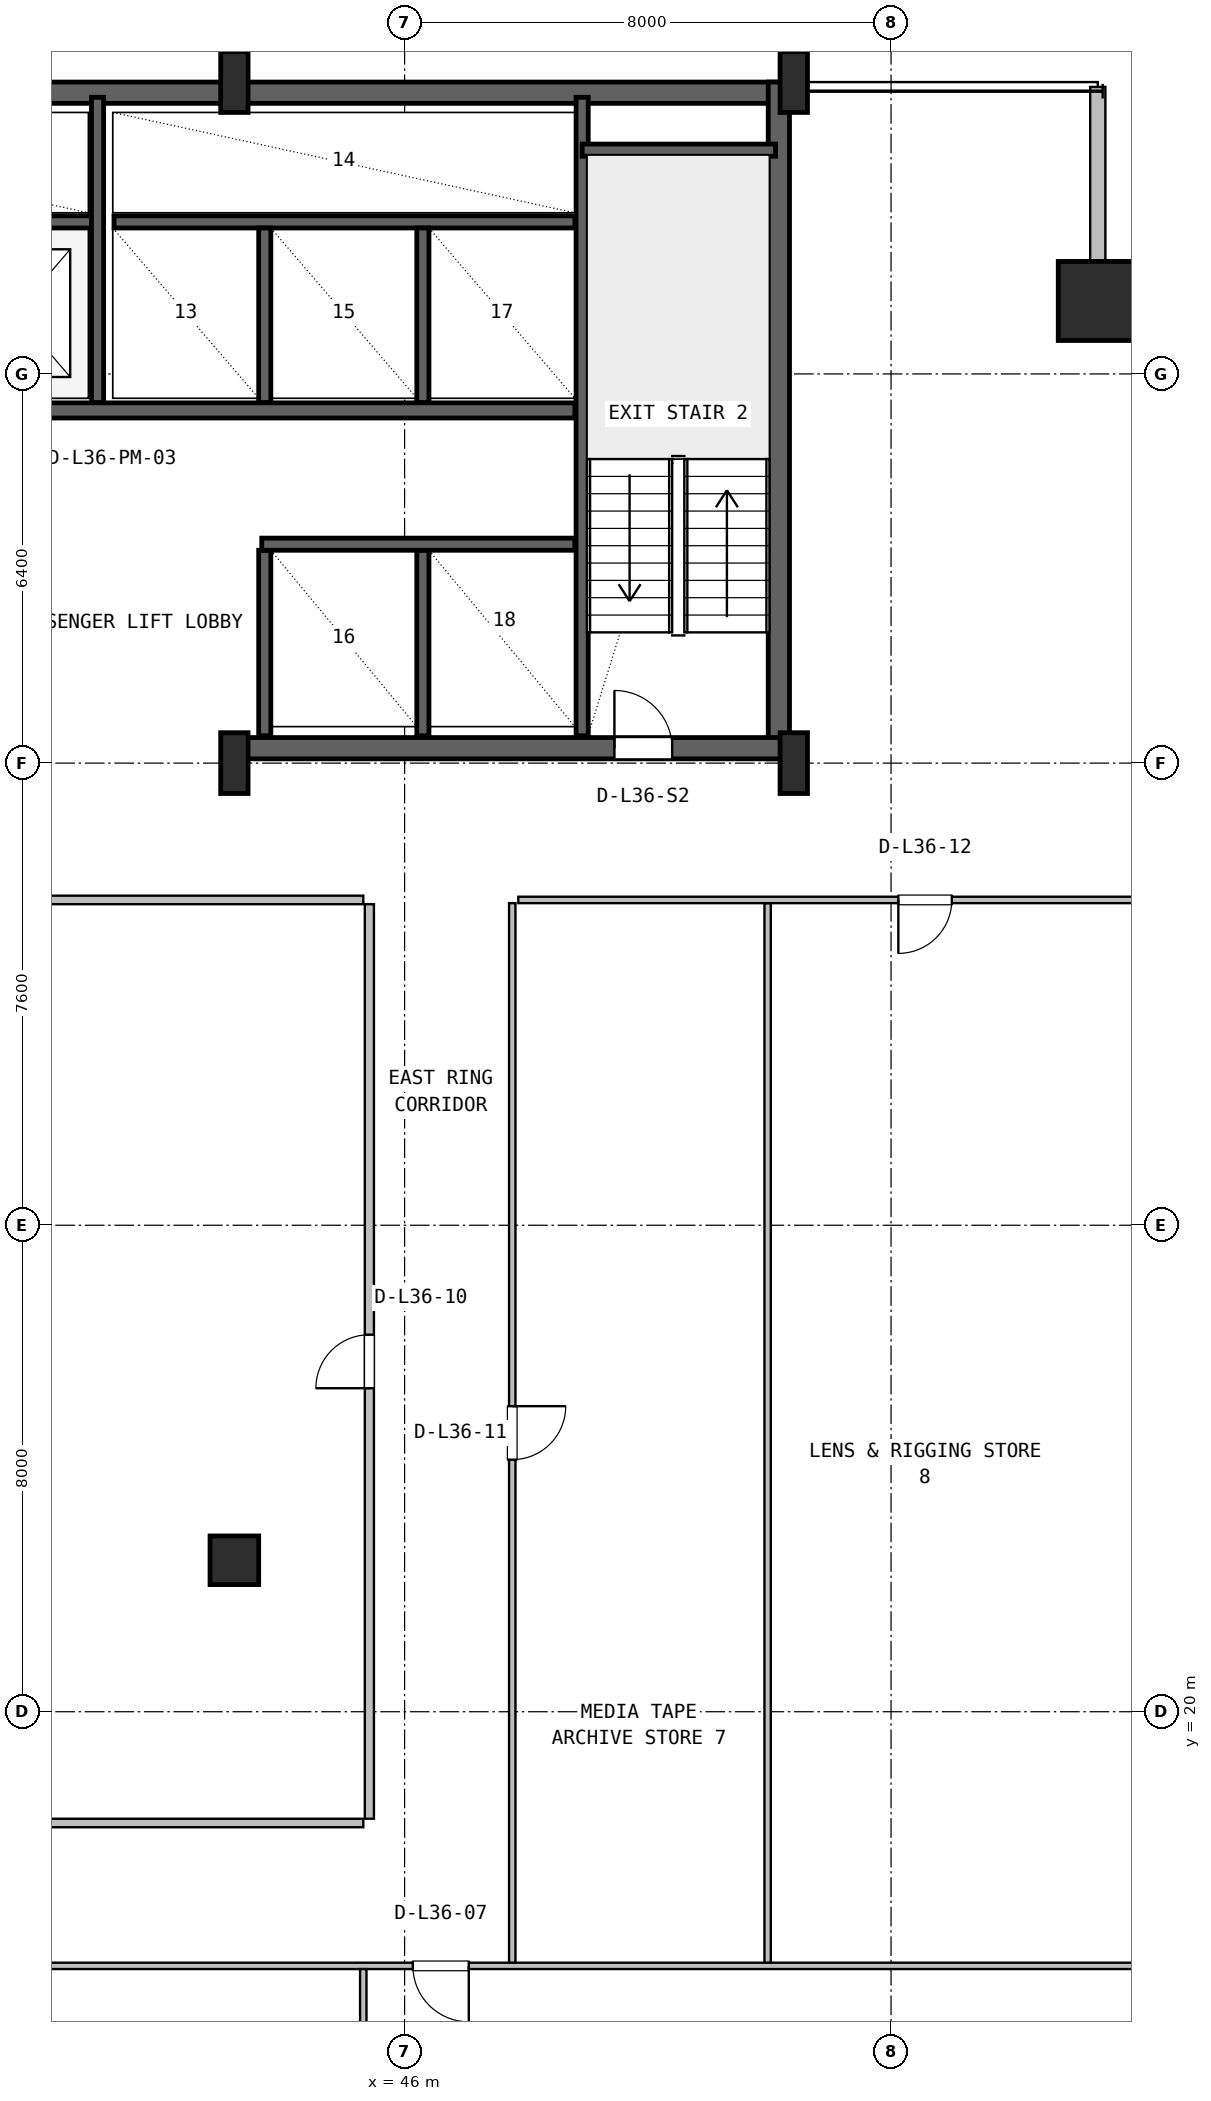
"""IFC4 building model, lengths in metres.
Left out: names, types, materials, properties, quantities, classifications, styles, units other than length and angle.
Written with IfcOpenShell. Run it as: python <this file> out.ifc"""

import sys

from ifc_helpers import new_model, si_unit, direction, frame, frame_2d, origin, origin_2d, place, context, subcontext, project, spatial, rectangle, hollow_rectangle, i_section, extrude, source, transform, mapped, element, fill, save


model = new_model("IFC4")
c1 = context("Model", 3, precision=1e-05, world=origin(), true_north=direction((0.0, 1.0)))
c2 = subcontext(c1, "Body", "Model", "MODEL_VIEW")
j1 = project(units=[si_unit("LENGTHUNIT", "METRE"), si_unit("PLANEANGLEUNIT", "RADIAN")], contexts=[c1])
p1 = place(None, origin())
s1 = spatial("IfcSite", under=j1, at=p1, CompositionType="ELEMENT")
p2 = place(p1, origin())
s2 = spatial("IfcBuilding", under=s1, at=p2, CompositionType="ELEMENT")
p3 = place(p2, frame((0.0, 0.0, 149.6)))
s3 = spatial("IfcBuildingStorey", under=s2, at=p3, CompositionType="ELEMENT", Elevation=149.6)
p4 = place(p3, frame((15.6, 46.625, 0.0), z_axis=(0.0, 0.0, 1.0), x_axis=(1.0, 0.0, 0.0)))
e1 = element("IfcWall", 1, at=p4, inside=s3, PredefinedType="SHEAR", context=c2, shape_type="SweptSolid", body=[
    extrude(rectangle(XDim=36.8, YDim=0.35, at=frame_2d((18.4, 0.0))), origin(), (0.0, 0.0, 1.0), 3.55),
])
p5 = place(p3, frame((52.155, 35.67, 0.0), z_axis=(0.0, 0.0, 1.0), x_axis=(0.0, 1.0, 0.0)))
e2 = element("IfcWall", 2, at=p5, inside=s3, PredefinedType="SHEAR", context=c2, shape_type="SweptSolid", body=[
    extrude(rectangle(XDim=11.13, YDim=0.35, at=frame_2d((5.565, 0.0))), origin(), (0.0, 0.0, 1.0), 3.55),
])
p6 = place(p3, frame((43.2, 35.845, 0.0), z_axis=(0.0, 0.0, 1.0), x_axis=(1.0, 0.0, 0.0)))
e3 = element("IfcWall", 3, at=p6, inside=s3, PredefinedType="SHEAR", context=c2, shape_type="SweptSolid", body=[
    extrude(rectangle(XDim=9.13, YDim=0.35, at=frame_2d((4.565, 0.0))), origin(), (0.0, 0.0, 1.0), 3.55),
])
p7 = place(p6, frame((6.25, 0.0, 0.0)))
e4 = element("IfcOpeningElement", 4, at=p7, cuts=e3, PredefinedType="OPENING", context=c2, shape_type="SweptSolid", body=[
    extrude(rectangle(XDim=0.95, YDim=2.1, at=frame_2d((0.475, 1.05))), frame((0.0, 0.185, 0.0), z_axis=(0.0, -1.0, 0.0), x_axis=(1.0, 0.0, 0.0)), (0.0, 0.0, 1.0), 0.37),
])
m1 = source(origin(), c2, "Body", "SweptSolid", [
    extrude(i_section(OverallWidth=0.45, OverallDepth=1.0, WebThickness=0.016, FlangeThickness=0.03, FilletRadius=0.016, at=origin_2d()), origin(), (0.0, 0.0, 1.0), 3.8),
])
for number, where, z_axis, x_axis in (
    (5, (43.2, 35.6, 0.0), (0.0, 0.0, 1.0), (1.0, 0.0, 0.0)),
    (6, (43.2, 46.8, 0.0), (0.0, 0.0, 1.0), (1.0, 0.0, 0.0)),
    (7, (52.4, 35.6, 0.0), (0.0, 0.0, 1.0), (1.0, 0.0, 0.0)),
    (8, (52.4, 46.8, 0.0), (0.0, 0.0, 1.0), (1.0, 0.0, 0.0)),
):
    element("IfcColumn", number, at=place(p3, frame(where, z_axis=z_axis, x_axis=x_axis)), inside=s3, PredefinedType="COLUMN", context=c2, shape_type="MappedRepresentation", body=[
        mapped(m1, transform((0.0, 0.0, 0.0), x_axis=(1.0, 0.0, 0.0), y_axis=(0.0, 1.0, 0.0), z_axis=(0.0, 0.0, 1.0), scale=1.0)),
    ])
m2 = source(origin(), c2, "Body", "SweptSolid", [
    extrude(hollow_rectangle(XDim=1.3, YDim=1.3, WallThickness=0.05, at=origin_2d()), origin(), (0.0, 0.0, 1.0), 3.8),
])
p8 = place(p3, frame((57.4, 43.2, 0.0), z_axis=(0.0, 0.0, 1.0), x_axis=(1.0, 0.0, 0.0)))
e9 = element("IfcColumn", 9, at=p8, inside=s3, PredefinedType="COLUMN", context=c2, shape_type="MappedRepresentation", body=[
    mapped(m2, transform((0.0, 0.0, 0.0), x_axis=(1.0, 0.0, 0.0), y_axis=(0.0, 1.0, 0.0), z_axis=(0.0, 0.0, 1.0), scale=1.0)),
])
m3 = source(origin(), c2, "Body", "SweptSolid", [
    extrude(rectangle(XDim=0.8, YDim=0.8, at=origin_2d()), origin(), (0.0, 0.0, 1.0), 3.8),
])
p9 = place(p3, frame((43.2, 22.49, 0.0), z_axis=(0.0, 0.0, 1.0), x_axis=(1.0, 0.0, 0.0)))
e10 = element("IfcColumn", 10, at=p9, inside=s3, PredefinedType="COLUMN", context=c2, shape_type="MappedRepresentation", body=[
    mapped(m3, transform((0.0, 0.0, 0.0), x_axis=(1.0, 0.0, 0.0), y_axis=(0.0, 1.0, 0.0), z_axis=(0.0, 0.0, 1.0), scale=1.0)),
])
p10 = place(p3, frame((57.53, 43.2, 0.0), z_axis=(0.0, 0.0, 1.0), x_axis=(1.0, 0.0, 0.0)))
e11 = element("IfcWall", 11, at=p10, inside=s3, PredefinedType="SOLIDWALL", context=c2, shape_type="SweptSolid", body=[
    extrude(rectangle(XDim=3.39, YDim=0.25, at=frame_2d((1.695, 0.0))), origin(), (0.0, 0.0, 1.0), 3.53),
])
p11 = place(p3, frame((57.4, 43.12, 0.0), z_axis=(0.0, 0.0, 1.0), x_axis=(0.0, 1.0, 0.0)))
e12 = element("IfcWall", 12, at=p11, inside=s3, PredefinedType="SOLIDWALL", context=c2, shape_type="SweptSolid", body=[
    extrude(rectangle(XDim=3.6, YDim=0.25, at=frame_2d((1.8, 0.0))), origin(), (0.0, 0.0, 1.0), 3.108),
])
p12 = place(p3, frame((48.92, 36.05, 0.0), z_axis=(0.0, 0.0, 1.0), x_axis=(0.0, 1.0, 0.0)))
e13 = element("IfcWall", 13, at=p12, inside=s3, PredefinedType="SHEAR", context=c2, shape_type="SweptSolid", body=[
    extrude(rectangle(XDim=10.5, YDim=0.2, at=frame_2d((5.25, 0.0))), origin(), (0.0, 0.0, 1.0), 3.55),
])
p13 = place(p3, frame((48.92, 45.68, 0.0), z_axis=(0.0, 0.0, 1.0), x_axis=(1.0, 0.0, 0.0)))
e14 = element("IfcWall", 14, at=p13, inside=s3, PredefinedType="SHEAR", context=c2, shape_type="SweptSolid", body=[
    extrude(rectangle(XDim=3.18, YDim=0.2, at=frame_2d((1.59, 0.0))), origin(), (0.0, 0.0, 1.0), 3.55),
])
p14 = place(p3, frame((24.98, 41.4, 0.0), z_axis=(0.0, 0.0, 1.0), x_axis=(1.0, 0.0, 0.0)))
e15 = element("IfcWall", 15, at=p14, inside=s3, PredefinedType="SHEAR", context=c2, shape_type="SweptSolid", body=[
    extrude(rectangle(XDim=23.82, YDim=0.25, at=frame_2d((11.91, 0.0))), origin(), (0.0, 0.0, 1.0), 3.55),
])
p15 = place(p14, frame((8.87, 0.0, 0.0)))
e16 = element("IfcOpeningElement", 16, at=p15, cuts=e15, PredefinedType="OPENING", context=c2, shape_type="SweptSolid", body=[
    extrude(rectangle(XDim=1.1, YDim=2.18, at=frame_2d((0.55, 1.09))), frame((0.0, 0.135, 0.0), z_axis=(0.0, -1.0, 0.0), x_axis=(1.0, 0.0, 0.0)), (0.0, 0.0, 1.0), 0.27),
])
p16 = place(p14, frame((11.47, 0.0, 0.0)))
e17 = element("IfcOpeningElement", 17, at=p16, cuts=e15, PredefinedType="OPENING", context=c2, shape_type="SweptSolid", body=[
    extrude(rectangle(XDim=1.1, YDim=2.18, at=frame_2d((0.55, 1.09))), frame((0.0, 0.135, 0.0), z_axis=(0.0, -1.0, 0.0), x_axis=(1.0, 0.0, 0.0)), (0.0, 0.0, 1.0), 0.27),
])
p17 = place(p14, frame((14.07, 0.0, 0.0)))
e18 = element("IfcOpeningElement", 18, at=p17, cuts=e15, PredefinedType="OPENING", context=c2, shape_type="SweptSolid", body=[
    extrude(rectangle(XDim=1.1, YDim=2.18, at=frame_2d((0.55, 1.09))), frame((0.0, 0.135, 0.0), z_axis=(0.0, -1.0, 0.0), x_axis=(1.0, 0.0, 0.0)), (0.0, 0.0, 1.0), 0.27),
])
p18 = place(p14, frame((1.81, 0.0, 0.0)))
e19 = element("IfcOpeningElement", 19, at=p18, cuts=e15, PredefinedType="OPENING", context=c2, shape_type="SweptSolid", body=[
    extrude(rectangle(XDim=0.92, YDim=2.08, at=frame_2d((0.46, 1.04))), frame((0.0, 0.135, 0.0), z_axis=(0.0, -1.0, 0.0), x_axis=(1.0, 0.0, 0.0)), (0.0, 0.0, 1.0), 0.27),
])
p19 = place(p14, frame((5.71, 0.0, 0.0)))
e20 = element("IfcOpeningElement", 20, at=p19, cuts=e15, PredefinedType="OPENING", context=c2, shape_type="SweptSolid", body=[
    extrude(rectangle(XDim=0.92, YDim=2.08, at=frame_2d((0.46, 1.04))), frame((0.0, 0.135, 0.0), z_axis=(0.0, -1.0, 0.0), x_axis=(1.0, 0.0, 0.0)), (0.0, 0.0, 1.0), 0.27),
])
p20 = place(p3, frame((33.22, 44.5, 0.0), z_axis=(0.0, 0.0, 1.0), x_axis=(1.0, 0.0, 0.0)))
e21 = element("IfcWall", 21, at=p20, inside=s3, PredefinedType="SHEAR", context=c2, shape_type="SweptSolid", body=[
    extrude(rectangle(XDim=7.63, YDim=0.2, at=frame_2d((3.815, 0.0))), origin(), (0.0, 0.0, 1.0), 3.55),
])
p21 = place(p3, frame((40.95, 41.53, 0.0), z_axis=(0.0, 0.0, 1.0), x_axis=(0.0, 1.0, 0.0)))
e22 = element("IfcWall", 22, at=p21, inside=s3, PredefinedType="SHEAR", context=c2, shape_type="SweptSolid", body=[
    extrude(rectangle(XDim=5.02, YDim=0.2, at=frame_2d((2.51, 0.0))), origin(), (0.0, 0.0, 1.0), 3.55),
])
p22 = place(p3, frame((41.22, 44.5, 0.0), z_axis=(0.0, 0.0, 1.0), x_axis=(1.0, 0.0, 0.0)))
e23 = element("IfcWall", 23, at=p22, inside=s3, PredefinedType="SHEAR", context=c2, shape_type="SweptSolid", body=[
    extrude(rectangle(XDim=7.58, YDim=0.2, at=frame_2d((3.79, 0.0))), origin(), (0.0, 0.0, 1.0), 3.55),
])
for number, where, z_axis, x_axis in (
    (24, (43.7, 41.53, 0.0), (0.0, 0.0, 1.0), (0.0, 1.0, 0.0)),
    (25, (46.3, 41.53, 0.0), (0.0, 0.0, 1.0), (0.0, 1.0, 0.0)),
):
    element("IfcWall", number, at=place(p3, frame(where, z_axis=z_axis, x_axis=x_axis)), inside=s3, PredefinedType="SHEAR", context=c2, shape_type="SweptSolid", body=[
        extrude(rectangle(XDim=2.87, YDim=0.2, at=frame_2d((1.435, 0.0))), origin(), (0.0, 0.0, 1.0), 3.55),
    ])
for number, where, z_axis, x_axis in (
    (26, (43.7, 36.05, 0.0), (0.0, 0.0, 1.0), (0.0, 1.0, 0.0)),
    (27, (46.3, 36.05, 0.0), (0.0, 0.0, 1.0), (0.0, 1.0, 0.0)),
):
    element("IfcWall", number, at=place(p3, frame(where, z_axis=z_axis, x_axis=x_axis)), inside=s3, PredefinedType="SHEAR", context=c2, shape_type="SweptSolid", body=[
        extrude(rectangle(XDim=3.05, YDim=0.2, at=frame_2d((1.525, 0.0))), origin(), (0.0, 0.0, 1.0), 3.55),
    ])
p23 = place(p3, frame((43.65, 39.2, 0.0), z_axis=(0.0, 0.0, 1.0), x_axis=(1.0, 0.0, 0.0)))
e28 = element("IfcWall", 28, at=p23, inside=s3, PredefinedType="SHEAR", context=c2, shape_type="SweptSolid", body=[
    extrude(rectangle(XDim=5.15, YDim=0.2, at=frame_2d((2.575, 0.0))), origin(), (0.0, 0.0, 1.0), 3.55),
])
p24 = place(p3, frame((7.18, 15.82, 0.0), z_axis=(0.0, 0.0, 1.0), x_axis=(1.0, 0.0, 0.0)))
e29 = element("IfcWall", 29, at=p24, inside=s3, PredefinedType="PARTITIONING", context=c2, shape_type="SweptSolid", body=[
    extrude(rectangle(XDim=53.64, YDim=0.105, at=frame_2d((26.82, 0.0))), origin(), (0.0, 0.0, 1.0), 2.909),
])
p25 = place(p24, frame((14.535, 0.0, 0.0)))
e30 = element("IfcOpeningElement", 30, at=p25, cuts=e29, PredefinedType="OPENING", context=c2, shape_type="SweptSolid", body=[
    extrude(rectangle(XDim=0.88, YDim=2.06, at=frame_2d((0.44, 1.03))), frame((0.0, 0.062, 0.0), z_axis=(0.0, -1.0, 0.0), x_axis=(1.0, 0.0, 0.0)), (0.0, 0.0, 1.0), 0.125),
])
p26 = place(p24, frame((26.755, 0.0, 0.0)))
e31 = element("IfcOpeningElement", 31, at=p26, cuts=e29, PredefinedType="OPENING", context=c2, shape_type="SweptSolid", body=[
    extrude(rectangle(XDim=0.88, YDim=2.06, at=frame_2d((0.44, 1.03))), frame((0.0, 0.062, 0.0), z_axis=(0.0, -1.0, 0.0), x_axis=(1.0, 0.0, 0.0)), (0.0, 0.0, 1.0), 0.125),
])
p27 = place(p24, frame((38.955, 0.0, 0.0)))
e32 = element("IfcOpeningElement", 32, at=p27, cuts=e29, PredefinedType="OPENING", context=c2, shape_type="SweptSolid", body=[
    extrude(rectangle(XDim=0.92, YDim=2.08, at=frame_2d((0.46, 1.04))), frame((0.0, 0.062, 0.0), z_axis=(0.0, -1.0, 0.0), x_axis=(1.0, 0.0, 0.0)), (0.0, 0.0, 1.0), 0.125),
])
p28 = place(p3, frame((45.32, 7.38, 0.0), z_axis=(0.0, 0.0, 1.0), x_axis=(0.0, 1.0, 0.0)))
e33 = element("IfcWall", 33, at=p28, inside=s3, PredefinedType="PARTITIONING", context=c2, shape_type="SweptSolid", body=[
    extrude(rectangle(XDim=8.388, YDim=0.105, at=frame_2d((4.194, 0.0))), origin(), (0.0, 0.0, 1.0), 3.108),
])
for number, where, z_axis, x_axis in (
    (34, (23.43, 18.17, 0.0), (0.0, 0.0, 1.0), (1.0, 0.0, 0.0)),
    (35, (23.43, 33.35, 0.0), (0.0, 0.0, 1.0), (1.0, 0.0, 0.0)),
):
    element("IfcWall", number, at=place(p3, frame(where, z_axis=z_axis, x_axis=x_axis)), inside=s3, PredefinedType="PARTITIONING", context=c2, shape_type="SweptSolid", body=[
        extrude(rectangle(XDim=21.89, YDim=0.14, at=frame_2d((10.945, 0.0))), origin(), (0.0, 0.0, 1.0), 2.909),
    ])
p29 = place(p3, frame((45.42, 18.24, 0.0), z_axis=(0.0, 0.0, 1.0), x_axis=(0.0, 1.0, 0.0)))
e36 = element("IfcWall", 36, at=p29, inside=s3, PredefinedType="PARTITIONING", context=c2, shape_type="SweptSolid", body=[
    extrude(rectangle(XDim=15.04, YDim=0.15, at=frame_2d((7.52, 0.0))), origin(), (0.0, 0.0, 1.0), 3.222),
])
p30 = place(p29, frame((7.08, 0.0, 0.0)))
e37 = element("IfcOpeningElement", 37, at=p30, cuts=e36, PredefinedType="OPENING", context=c2, shape_type="SweptSolid", body=[
    extrude(rectangle(XDim=0.88, YDim=2.06, at=frame_2d((0.44, 1.03))), frame((0.0, 0.085, 0.0), z_axis=(0.0, -1.0, 0.0), x_axis=(1.0, 0.0, 0.0)), (0.0, 0.0, 1.0), 0.17),
])
p31 = place(p3, frame((51.97, 15.873, 0.0), z_axis=(0.0, 0.0, 1.0), x_axis=(0.0, 1.0, 0.0)))
e38 = element("IfcWall", 38, at=p31, inside=s3, PredefinedType="PARTITIONING", context=c2, shape_type="SweptSolid", body=[
    extrude(rectangle(XDim=17.424, YDim=0.105, at=frame_2d((8.712, 0.0))), origin(), (0.0, 0.0, 1.0), 3.222),
])
p32 = place(p3, frame((47.87, 33.35, 0.0), z_axis=(0.0, 0.0, 1.0), x_axis=(1.0, 0.0, 0.0)))
e39 = element("IfcWall", 39, at=p32, inside=s3, PredefinedType="PARTITIONING", context=c2, shape_type="SweptSolid", body=[
    extrude(rectangle(XDim=12.95, YDim=0.105, at=frame_2d((6.475, 0.0))), origin(), (0.0, 0.0, 1.0), 3.108),
])
p33 = place(p32, frame((6.25, 0.0, 0.0)))
e40 = element("IfcOpeningElement", 40, at=p33, cuts=e39, PredefinedType="OPENING", context=c2, shape_type="SweptSolid", body=[
    extrude(rectangle(XDim=0.88, YDim=2.06, at=frame_2d((0.44, 1.03))), frame((0.0, 0.062, 0.0), z_axis=(0.0, -1.0, 0.0), x_axis=(1.0, 0.0, 0.0)), (0.0, 0.0, 1.0), 0.125),
])
p34 = place(p3, frame((47.77, 15.873, 0.0), z_axis=(0.0, 0.0, 1.0), x_axis=(0.0, 1.0, 0.0)))
e41 = element("IfcWall", 41, at=p34, inside=s3, PredefinedType="PARTITIONING", context=c2, shape_type="SweptSolid", body=[
    extrude(rectangle(XDim=17.424, YDim=0.105, at=frame_2d((8.712, 0.0))), origin(), (0.0, 0.0, 1.0), 3.222),
])
p35 = place(p34, frame((8.272, 0.0, 0.0)))
e42 = element("IfcOpeningElement", 42, at=p35, cuts=e41, PredefinedType="OPENING", context=c2, shape_type="SweptSolid", body=[
    extrude(rectangle(XDim=0.88, YDim=2.06, at=frame_2d((0.44, 1.03))), frame((0.0, 0.062, 0.0), z_axis=(0.0, -1.0, 0.0), x_axis=(1.0, 0.0, 0.0)), (0.0, 0.0, 1.0), 0.125),
])
m4 = source(origin(), c2, "Body", "SweptSolid", [
    extrude(rectangle(XDim=0.95, YDim=2.1, at=frame_2d((0.475, 1.05))), frame((0.0, 0.025, 0.0), z_axis=(0.0, -1.0, 0.0), x_axis=(1.0, 0.0, 0.0)), (0.0, 0.0, 1.0), 0.05),
])
p36 = place(p7, origin())
e43 = element("IfcDoor", 43, at=p36, inside=s3, OperationType="SINGLE_SWING_LEFT", PredefinedType="DOOR", context=c2, shape_type="MappedRepresentation", body=[
    mapped(m4, transform((0.0, 0.0, 0.0), x_axis=(1.0, 0.0, 0.0), y_axis=(0.0, 1.0, 0.0), z_axis=(0.0, 0.0, 1.0), scale=1.0)),
])
fill(e4, e43)
m5 = source(origin(), c2, "Body", "SweptSolid", [
    extrude(rectangle(XDim=0.92, YDim=2.08, at=frame_2d((0.46, 1.04))), frame((0.0, 0.025, 0.0), z_axis=(0.0, -1.0, 0.0), x_axis=(1.0, 0.0, 0.0)), (0.0, 0.0, 1.0), 0.05),
])
p37 = place(p27, frame((0.92, 0.0, 0.0), z_axis=(0.0, 0.0, 1.0), x_axis=(-1.0, 0.0, 0.0)))
e44 = element("IfcDoor", 44, at=p37, inside=s3, OperationType="SINGLE_SWING_RIGHT", PredefinedType="DOOR", context=c2, shape_type="MappedRepresentation", body=[
    mapped(m5, transform((0.0, 0.0, 0.0), x_axis=(1.0, 0.0, 0.0), y_axis=(0.0, 1.0, 0.0), z_axis=(0.0, 0.0, 1.0), scale=1.0)),
])
fill(e32, e44)
m6 = source(origin(), c2, "Body", "SweptSolid", [
    extrude(rectangle(XDim=0.88, YDim=2.06, at=frame_2d((0.44, 1.03))), frame((0.0, 0.025, 0.0), z_axis=(0.0, -1.0, 0.0), x_axis=(1.0, 0.0, 0.0)), (0.0, 0.0, 1.0), 0.05),
])
p38 = place(p30, origin())
e45 = element("IfcDoor", 45, at=p38, inside=s3, OperationType="SINGLE_SWING_LEFT", PredefinedType="DOOR", context=c2, shape_type="MappedRepresentation", body=[
    mapped(m6, transform((0.0, 0.0, 0.0), x_axis=(1.0, 0.0, 0.0), y_axis=(0.0, 1.0, 0.0), z_axis=(0.0, 0.0, 1.0), scale=1.0)),
])
fill(e37, e45)
p39 = place(p35, frame((0.88, 0.0, 0.0), z_axis=(0.0, 0.0, 1.0), x_axis=(-1.0, 0.0, 0.0)))
e46 = element("IfcDoor", 46, at=p39, inside=s3, OperationType="SINGLE_SWING_RIGHT", PredefinedType="DOOR", context=c2, shape_type="MappedRepresentation", body=[
    mapped(m6, transform((0.0, 0.0, 0.0), x_axis=(1.0, 0.0, 0.0), y_axis=(0.0, 1.0, 0.0), z_axis=(0.0, 0.0, 1.0), scale=1.0)),
])
fill(e42, e46)
p40 = place(p33, frame((0.88, 0.0, 0.0), z_axis=(0.0, 0.0, 1.0), x_axis=(-1.0, 0.0, 0.0)))
e47 = element("IfcDoor", 47, at=p40, inside=s3, OperationType="SINGLE_SWING_LEFT", PredefinedType="DOOR", context=c2, shape_type="MappedRepresentation", body=[
    mapped(m6, transform((0.0, 0.0, 0.0), x_axis=(1.0, 0.0, 0.0), y_axis=(0.0, 1.0, 0.0), z_axis=(0.0, 0.0, 1.0), scale=1.0)),
])
fill(e40, e47)
save(model, sys.argv[1])
